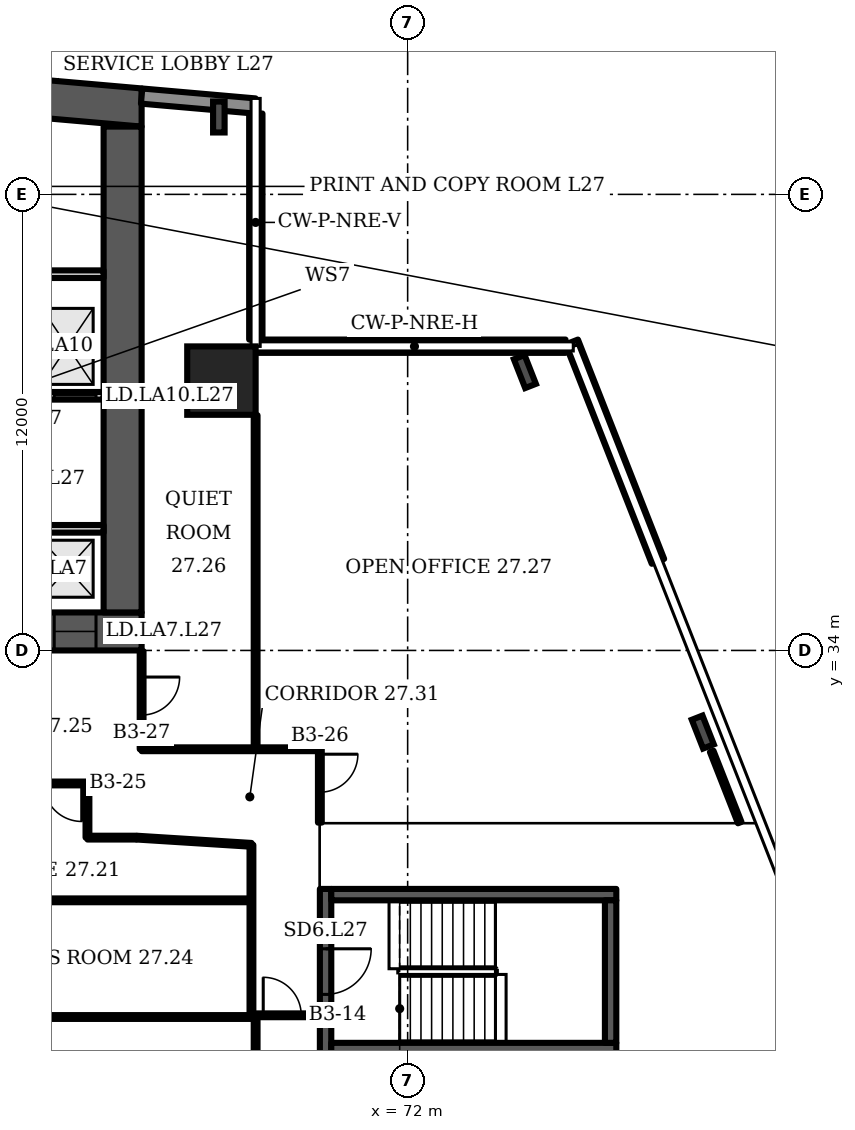
"""IFC4 building model, lengths in metres.
Left out: names, types, materials, properties, quantities, classifications, styles, units other than length and angle.
Written with IfcOpenShell. Run it as: python <this file> out.ifc"""

import sys

from ifc_helpers import new_model, si_unit, direction, frame, frame_2d, origin, origin_2d, place, context, subcontext, project, spatial, polyline, rectangle, i_section, outline, extrude, element, fill, save


model = new_model("IFC4")
c1 = context("Model", 3, precision=1e-05, world=origin(), true_north=direction((0.0, 1.0)))
c2 = subcontext(c1, "Body", "Model", "MODEL_VIEW")
j1 = project(units=[si_unit("LENGTHUNIT", "METRE"), si_unit("PLANEANGLEUNIT", "RADIAN")], contexts=[c1])
p1 = place(None, origin())
s1 = spatial("IfcSite", under=j1, at=p1, CompositionType="ELEMENT")
p2 = place(p1, origin())
s2 = spatial("IfcBuilding", under=s1, at=p2, CompositionType="ELEMENT")
p3 = place(p2, frame((0.0, 0.0, 118.3)))
s3 = spatial("IfcBuildingStorey", under=s2, at=p3, CompositionType="ELEMENT", Elevation=118.3)
p4 = place(p3, frame((0.0, 0.0, -0.0)))
e1 = element("IfcWall", 1, at=p4, inside=s3, PredefinedType="SHEAR", context=c2, shape_type="SweptSolid", body=[
    extrude(outline(polyline([(16.0, 47.784), (40.5, 49.927), (65.0, 47.784), (65.0, 48.787), (40.5, 50.931), (16.0, 48.787), (16.0, 47.784)])), origin(), (0.0, 0.0, 1.0), 3.6),
])
p5 = place(p3, frame((16.0, 34.5, 0.0), z_axis=(0.0, 0.0, 1.0), x_axis=(1.0, 0.0, 0.0)))
e2 = element("IfcWall", 2, at=p5, inside=s3, PredefinedType="SHEAR", context=c2, shape_type="SweptSolid", body=[
    extrude(rectangle(XDim=49.0, YDim=1.0, at=frame_2d((24.5, 0.0))), origin(), (0.0, 0.0, 1.0), 3.6),
])
p6 = place(p5, frame((1.2, 0.0, 0.0)))
e3 = element("IfcOpeningElement", 3, at=p6, cuts=e2, PredefinedType="OPENING", context=c2, shape_type="SweptSolid", body=[
    extrude(rectangle(XDim=1.1, YDim=2.1, at=frame_2d((0.55, 1.05))), frame((0.0, 0.51, 0.0), z_axis=(0.0, -1.0, 0.0), x_axis=(1.0, 0.0, 0.0)), (0.0, 0.0, 1.0), 1.02),
])
p7 = place(p5, frame((5.083, 0.0, 0.0)))
e4 = element("IfcOpeningElement", 4, at=p7, cuts=e2, PredefinedType="OPENING", context=c2, shape_type="SweptSolid", body=[
    extrude(rectangle(XDim=1.1, YDim=2.1, at=frame_2d((0.55, 1.05))), frame((0.0, 0.51, 0.0), z_axis=(0.0, -1.0, 0.0), x_axis=(1.0, 0.0, 0.0)), (0.0, 0.0, 1.0), 1.02),
])
p8 = place(p5, frame((2.933, 0.0, 0.0)))
e5 = element("IfcOpeningElement", 5, at=p8, cuts=e2, PredefinedType="OPENING", context=c2, shape_type="SweptSolid", body=[
    extrude(rectangle(XDim=1.4, YDim=2.1, at=frame_2d((0.7, 1.05))), frame((0.0, 0.51, 0.0), z_axis=(0.0, -1.0, 0.0), x_axis=(1.0, 0.0, 0.0)), (0.0, 0.0, 1.0), 1.02),
])
p9 = place(p5, frame((7.65, 0.0, 0.0)))
e6 = element("IfcOpeningElement", 6, at=p9, cuts=e2, PredefinedType="OPENING", context=c2, shape_type="SweptSolid", body=[
    extrude(rectangle(XDim=1.2, YDim=2.1, at=frame_2d((0.6, 1.05))), frame((0.0, 0.51, 0.0), z_axis=(0.0, -1.0, 0.0), x_axis=(1.0, 0.0, 0.0)), (0.0, 0.0, 1.0), 1.02),
])
p10 = place(p5, frame((14.817, 0.0, 0.0)))
e7 = element("IfcOpeningElement", 7, at=p10, cuts=e2, PredefinedType="OPENING", context=c2, shape_type="SweptSolid", body=[
    extrude(rectangle(XDim=1.1, YDim=2.1, at=frame_2d((0.55, 1.05))), frame((0.0, 0.51, 0.0), z_axis=(0.0, -1.0, 0.0), x_axis=(1.0, 0.0, 0.0)), (0.0, 0.0, 1.0), 1.02),
])
p11 = place(p5, frame((19.083, 0.0, 0.0)))
e8 = element("IfcOpeningElement", 8, at=p11, cuts=e2, PredefinedType="OPENING", context=c2, shape_type="SweptSolid", body=[
    extrude(rectangle(XDim=1.1, YDim=2.1, at=frame_2d((0.55, 1.05))), frame((0.0, 0.51, 0.0), z_axis=(0.0, -1.0, 0.0), x_axis=(1.0, 0.0, 0.0)), (0.0, 0.0, 1.0), 1.02),
])
p12 = place(p5, frame((16.8, 0.0, 0.0)))
e9 = element("IfcOpeningElement", 9, at=p12, cuts=e2, PredefinedType="OPENING", context=c2, shape_type="SweptSolid", body=[
    extrude(rectangle(XDim=1.4, YDim=2.1, at=frame_2d((0.7, 1.05))), frame((0.0, 0.51, 0.0), z_axis=(0.0, -1.0, 0.0), x_axis=(1.0, 0.0, 0.0)), (0.0, 0.0, 1.0), 1.02),
])
p13 = place(p5, frame((21.817, 0.0, 0.0)))
e10 = element("IfcOpeningElement", 10, at=p13, cuts=e2, PredefinedType="OPENING", context=c2, shape_type="SweptSolid", body=[
    extrude(rectangle(XDim=1.1, YDim=2.1, at=frame_2d((0.55, 1.05))), frame((0.0, 0.51, 0.0), z_axis=(0.0, -1.0, 0.0), x_axis=(1.0, 0.0, 0.0)), (0.0, 0.0, 1.0), 1.02),
])
p14 = place(p5, frame((26.083, 0.0, 0.0)))
e11 = element("IfcOpeningElement", 11, at=p14, cuts=e2, PredefinedType="OPENING", context=c2, shape_type="SweptSolid", body=[
    extrude(rectangle(XDim=1.1, YDim=2.1, at=frame_2d((0.55, 1.05))), frame((0.0, 0.51, 0.0), z_axis=(0.0, -1.0, 0.0), x_axis=(1.0, 0.0, 0.0)), (0.0, 0.0, 1.0), 1.02),
])
p15 = place(p5, frame((33.15, 0.0, 0.0)))
e12 = element("IfcOpeningElement", 12, at=p15, cuts=e2, PredefinedType="OPENING", context=c2, shape_type="SweptSolid", body=[
    extrude(rectangle(XDim=1.2, YDim=2.1, at=frame_2d((0.6, 1.05))), frame((0.0, 0.51, 0.0), z_axis=(0.0, -1.0, 0.0), x_axis=(1.0, 0.0, 0.0)), (0.0, 0.0, 1.0), 1.02),
])
p16 = place(p5, frame((37.8, 0.0, 0.0)))
e13 = element("IfcOpeningElement", 13, at=p16, cuts=e2, PredefinedType="OPENING", context=c2, shape_type="SweptSolid", body=[
    extrude(rectangle(XDim=1.4, YDim=2.1, at=frame_2d((0.7, 1.05))), frame((0.0, 0.51, 0.0), z_axis=(0.0, -1.0, 0.0), x_axis=(1.0, 0.0, 0.0)), (0.0, 0.0, 1.0), 1.02),
])
p17 = place(p5, frame((42.817, 0.0, 0.0)))
e14 = element("IfcOpeningElement", 14, at=p17, cuts=e2, PredefinedType="OPENING", context=c2, shape_type="SweptSolid", body=[
    extrude(rectangle(XDim=1.1, YDim=2.1, at=frame_2d((0.55, 1.05))), frame((0.0, 0.51, 0.0), z_axis=(0.0, -1.0, 0.0), x_axis=(1.0, 0.0, 0.0)), (0.0, 0.0, 1.0), 1.02),
])
p18 = place(p5, frame((46.7, 0.0, 0.0)))
e15 = element("IfcOpeningElement", 15, at=p18, cuts=e2, PredefinedType="OPENING", context=c2, shape_type="SweptSolid", body=[
    extrude(rectangle(XDim=1.1, YDim=2.1, at=frame_2d((0.55, 1.05))), frame((0.0, 0.51, 0.0), z_axis=(0.0, -1.0, 0.0), x_axis=(1.0, 0.0, 0.0)), (0.0, 0.0, 1.0), 1.02),
])
p19 = place(p5, frame((44.667, 0.0, 0.0)))
e16 = element("IfcOpeningElement", 16, at=p19, cuts=e2, PredefinedType="OPENING", context=c2, shape_type="SweptSolid", body=[
    extrude(rectangle(XDim=1.4, YDim=2.1, at=frame_2d((0.7, 1.05))), frame((0.0, 0.51, 0.0), z_axis=(0.0, -1.0, 0.0), x_axis=(1.0, 0.0, 0.0)), (0.0, 0.0, 1.0), 1.02),
])
p20 = place(p3, frame((64.5, 35.0, 0.0), z_axis=(0.0, 0.0, 1.0), x_axis=(0.0, 1.0, 0.0)))
e17 = element("IfcWall", 17, at=p20, inside=s3, PredefinedType="SHEAR", context=c2, shape_type="SweptSolid", body=[
    extrude(rectangle(XDim=12.784, YDim=1.0, at=frame_2d((6.392, 0.0))), origin(), (0.0, 0.0, 1.0), 3.6),
])
p21 = place(p3, frame((67.1, 41.1, 0.0), z_axis=(0.0, 0.0, 1.0), x_axis=(1.0, 0.0, 0.0)))
e18 = element("IfcColumn", 18, at=p21, inside=s3, PredefinedType="COLUMN", context=c2, shape_type="SweptSolid", body=[
    extrude(rectangle(XDim=1.8, YDim=1.8, at=origin_2d()), origin(), (0.0, 0.0, 1.0), 3.6),
])
for number, where, z_axis, x_axis in (
    (19, (79.766, 31.853, 0.0), (0.0, 0.0, 1.0), (0.931, 0.366, 0.0)),
    (20, (75.085, 41.338, 0.0), (0.0, 0.0, 1.0), (0.931, 0.366, 0.0)),
    (21, (67.032, 48.036, 0.0), (0.0, 0.0, 1.0), (1.0, 0.0, 0.0)),
):
    element("IfcColumn", number, at=place(p3, frame(where, z_axis=z_axis, x_axis=x_axis)), inside=s3, PredefinedType="COLUMN", context=c2, shape_type="SweptSolid", body=[
        extrude(i_section(OverallWidth=0.303, OverallDepth=0.814, WebThickness=0.021, FlangeThickness=0.04, FilletRadius=0.03, at=origin_2d()), origin(), (0.0, 0.0, 1.0), 3.6),
    ])
p22 = place(p3, frame((67.983, 48.326, 0.0), z_axis=(0.0, 0.0, 1.0), x_axis=(-0.996194, 0.087168, 0.0)))
e22 = element("IfcWall", 22, at=p22, inside=s3, PredefinedType="SOLIDWALL", context=c2, shape_type="SweptSolid", body=[
    extrude(rectangle(XDim=2.994, YDim=0.4, at=frame_2d((1.497, 0.0))), origin(), (0.0, 0.0, 1.0), 3.2),
])
p23 = place(p3, frame((78.586, 36.344, 0.0), z_axis=(0.0, 0.0, 1.0), x_axis=(-0.365792, 0.930699, 0.0)))
e23 = element("IfcWall", 23, at=p23, inside=s3, PredefinedType="SOLIDWALL", context=c2, shape_type="SweptSolid", body=[
    extrude(rectangle(XDim=6.202, YDim=0.35, at=frame_2d((3.101, 0.0))), origin(), (0.0, 0.0, 1.0), 1.0),
])
p24 = place(p3, frame((76.155, 42.005, 0.0), z_axis=(0.0, 0.0, 1.0), x_axis=(-1.0, 0.0, 0.0)))
e24 = element("IfcWall", 24, at=p24, inside=s3, PredefinedType="SOLIDWALL", context=c2, shape_type="SweptSolid", body=[
    extrude(rectangle(XDim=8.155, YDim=0.35, at=frame_2d((4.078, 0.0))), origin(), (0.0, 0.0, 1.0), 1.0),
])
p25 = place(p3, frame((68.005, 42.18, 0.0), z_axis=(0.0, 0.0, 1.0), x_axis=(0.0, 1.0, 0.0)))
e25 = element("IfcWall", 25, at=p25, inside=s3, PredefinedType="SOLIDWALL", context=c2, shape_type="SweptSolid", body=[
    extrude(rectangle(XDim=5.947, YDim=0.35, at=frame_2d((2.973, 0.0))), origin(), (0.0, 0.0, 1.0), 1.0),
])
p26 = place(p3, frame((58.5, 40.7, 0.0), z_axis=(0.0, 0.0, 1.0), x_axis=(1.0, 0.0, 0.0)))
e26 = element("IfcWall", 26, at=p26, inside=s3, PredefinedType="PARTITIONING", context=c2, shape_type="SweptSolid", body=[
    extrude(rectangle(XDim=5.5, YDim=0.2, at=frame_2d((2.75, 0.0))), origin(), (0.0, 0.0, 1.0), 3.2),
])
p27 = place(p26, frame((0.317, 0.0, 0.0)))
e27 = element("IfcOpeningElement", 27, at=p27, cuts=e26, PredefinedType="OPENING", context=c2, shape_type="SweptSolid", body=[
    extrude(rectangle(XDim=1.1, YDim=2.1, at=frame_2d((0.55, 1.05))), frame((0.0, 0.11, 0.0), z_axis=(0.0, -1.0, 0.0), x_axis=(1.0, 0.0, 0.0)), (0.0, 0.0, 1.0), 0.22),
])
p28 = place(p26, frame((2.317, 0.0, 0.0)))
e28 = element("IfcOpeningElement", 28, at=p28, cuts=e26, PredefinedType="OPENING", context=c2, shape_type="SweptSolid", body=[
    extrude(rectangle(XDim=1.1, YDim=2.1, at=frame_2d((0.55, 1.05))), frame((0.0, 0.11, 0.0), z_axis=(0.0, -1.0, 0.0), x_axis=(1.0, 0.0, 0.0)), (0.0, 0.0, 1.0), 0.22),
])
p29 = place(p26, frame((4.2, 0.0, 0.0)))
e29 = element("IfcOpeningElement", 29, at=p29, cuts=e26, PredefinedType="OPENING", context=c2, shape_type="SweptSolid", body=[
    extrude(rectangle(XDim=1.1, YDim=2.1, at=frame_2d((0.55, 1.05))), frame((0.0, 0.11, 0.0), z_axis=(0.0, -1.0, 0.0), x_axis=(1.0, 0.0, 0.0)), (0.0, 0.0, 1.0), 0.22),
])
p30 = place(p3, frame((0.0, 0.0, -0.0)))
e30 = element("IfcWall", 30, at=p30, inside=s3, PredefinedType="PARTITIONING", context=c2, shape_type="SweptSolid", body=[
    extrude(outline(polyline([(62.3, 37.3), (62.5, 37.3), (64.0, 37.3), (64.0, 37.1), (62.5, 37.1), (62.5, 35.0), (62.3, 35.0), (62.3, 37.3)])), origin(), (0.0, 0.0, 1.0), 3.2),
])
p31 = place(p3, frame((0.0, 0.0, -0.0)))
e31 = element("IfcWall", 31, at=p31, inside=s3, PredefinedType="PARTITIONING", context=c2, shape_type="SweptSolid", body=[
    extrude(outline(polyline([(60.433, 40.8), (60.233, 40.8), (60.233, 43.8), (58.5, 43.8), (58.5, 44.0), (64.0, 44.0), (64.0, 43.8), (62.5, 43.8), (62.5, 40.8), (62.3, 40.8), (62.3, 43.8), (60.433, 43.8), (60.433, 40.8)])), origin(), (0.0, 0.0, 1.0), 3.2),
])
p32 = place(p3, frame((69.84, 23.375, 0.0), z_axis=(0.0, 0.0, 1.0), x_axis=(0.0, 1.0, 0.0)))
e32 = element("IfcWall", 32, at=p32, inside=s3, PredefinedType="SHEAR", context=c2, shape_type="SweptSolid", body=[
    extrude(rectangle(XDim=4.35, YDim=0.3, at=frame_2d((2.175, 0.0))), origin(), (0.0, 0.0, 1.0), 3.2),
])
p33 = place(p32, frame((1.575, 0.0, 0.0)))
e33 = element("IfcOpeningElement", 33, at=p33, cuts=e32, PredefinedType="OPENING", context=c2, shape_type="SweptSolid", body=[
    extrude(rectangle(XDim=1.2, YDim=2.1, at=frame_2d((0.6, 1.05))), frame((0.0, 0.16, 0.0), z_axis=(0.0, -1.0, 0.0), x_axis=(1.0, 0.0, 0.0)), (0.0, 0.0, 1.0), 0.32),
])
p34 = place(p3, frame((59.4, 24.355, 0.0), z_axis=(0.0, 0.0, 1.0), x_axis=(1.0, 0.0, 0.0)))
e34 = element("IfcWall", 34, at=p34, inside=s3, PredefinedType="PARTITIONING", context=c2, shape_type="SweptSolid", body=[
    extrude(rectangle(XDim=8.6, YDim=0.1, at=frame_2d((4.3, 0.0))), origin(), (0.0, 0.0, 1.0), 3.2),
])
p35 = place(p3, frame((59.4, 27.425, 0.0), z_axis=(0.0, 0.0, 1.0), x_axis=(1.0, 0.0, 0.0)))
e35 = element("IfcWall", 35, at=p35, inside=s3, PredefinedType="PARTITIONING", context=c2, shape_type="SweptSolid", body=[
    extrude(rectangle(XDim=8.49, YDim=0.1, at=frame_2d((4.245, 0.0))), origin(), (0.0, 0.0, 1.0), 3.2),
])
p36 = place(p3, frame((59.4, 30.5, 0.0), z_axis=(0.0, 0.0, 1.0), x_axis=(1.0, 0.0, 0.0)))
e36 = element("IfcWall", 36, at=p36, inside=s3, PredefinedType="PARTITIONING", context=c2, shape_type="SweptSolid", body=[
    extrude(rectangle(XDim=4.175, YDim=0.1, at=frame_2d((2.087, 0.0))), origin(), (0.0, 0.0, 1.0), 3.2),
])
p37 = place(p36, frame((3.025, 0.0, 0.0)))
e37 = element("IfcOpeningElement", 37, at=p37, cuts=e36, PredefinedType="OPENING", context=c2, shape_type="SweptSolid", body=[
    extrude(rectangle(XDim=1.0, YDim=2.1, at=frame_2d((0.5, 1.05))), frame((0.0, 0.06, 0.0), z_axis=(0.0, -1.0, 0.0), x_axis=(1.0, 0.0, 0.0)), (0.0, 0.0, 1.0), 0.12),
])
p38 = place(p3, frame((63.575, 29.075, 0.0), z_axis=(0.0, 0.0, 1.0), x_axis=(0.0, 1.0, 0.0)))
e38 = element("IfcWall", 38, at=p38, inside=s3, PredefinedType="PARTITIONING", context=c2, shape_type="SweptSolid", body=[
    extrude(rectangle(XDim=1.425, YDim=0.1, at=frame_2d((0.712, 0.0))), origin(), (0.0, 0.0, 1.0), 3.2),
])
p39 = place(p3, frame((63.575, 29.075, 0.0), z_axis=(0.0, 0.0, 1.0), x_axis=(1.0, 0.0, 0.0)))
e39 = element("IfcWall", 39, at=p39, inside=s3, PredefinedType="PARTITIONING", context=c2, shape_type="SweptSolid", body=[
    extrude(rectangle(XDim=1.285, YDim=0.1, at=frame_2d((0.643, 0.0))), origin(), (0.0, 0.0, 1.0), 3.2),
])
p40 = place(p3, frame((65.0, 31.4, 0.0), z_axis=(0.0, 0.0, 1.0), x_axis=(0.0, 1.0, 0.0)))
e40 = element("IfcWall", 40, at=p40, inside=s3, PredefinedType="PARTITIONING", context=c2, shape_type="SweptSolid", body=[
    extrude(rectangle(XDim=2.58, YDim=0.1, at=frame_2d((1.29, 0.0))), origin(), (0.0, 0.0, 1.0), 3.2),
])
p41 = place(p40, frame((0.9, 0.0, 0.0)))
e41 = element("IfcOpeningElement", 41, at=p41, cuts=e40, PredefinedType="OPENING", context=c2, shape_type="SweptSolid", body=[
    extrude(rectangle(XDim=1.0, YDim=2.1, at=frame_2d((0.5, 1.05))), frame((0.0, 0.06, 0.0), z_axis=(0.0, -1.0, 0.0), x_axis=(1.0, 0.0, 0.0)), (0.0, 0.0, 1.0), 0.12),
])
p42 = place(p3, frame((65.0, 31.4, 0.0), z_axis=(0.0, 0.0, 1.0), x_axis=(1.0, 0.0, 0.0)))
e42 = element("IfcWall", 42, at=p42, inside=s3, PredefinedType="PARTITIONING", context=c2, shape_type="SweptSolid", body=[
    extrude(rectangle(XDim=4.69, YDim=0.1, at=frame_2d((2.345, 0.0))), origin(), (0.0, 0.0, 1.0), 3.2),
])
p43 = place(p3, frame((67.89, 24.4, 0.0), z_axis=(0.0, 0.0, 1.0), x_axis=(0.0, 1.0, 0.0)))
e43 = element("IfcWall", 43, at=p43, inside=s3, PredefinedType="PARTITIONING", context=c2, shape_type="SweptSolid", body=[
    extrude(rectangle(XDim=4.485, YDim=0.1, at=frame_2d((2.243, 0.0))), origin(), (0.0, 0.0, 1.0), 3.2),
])
p44 = place(p3, frame((68.0, 24.4, 0.0), z_axis=(0.0, 0.0, 1.0), x_axis=(1.0, 0.0, 0.0)))
e44 = element("IfcWall", 44, at=p44, inside=s3, PredefinedType="PARTITIONING", context=c2, shape_type="SweptSolid", body=[
    extrude(rectangle(XDim=1.67, YDim=0.1, at=frame_2d((0.835, 0.0))), origin(), (0.0, 0.0, 1.0), 3.2),
])
p45 = place(p44, frame((0.2, 0.0, 0.0)))
e45 = element("IfcOpeningElement", 45, at=p45, cuts=e44, PredefinedType="OPENING", context=c2, shape_type="SweptSolid", body=[
    extrude(rectangle(XDim=1.0, YDim=2.1, at=frame_2d((0.5, 1.05))), frame((0.0, 0.06, 0.0), z_axis=(0.0, -1.0, 0.0), x_axis=(1.0, 0.0, 0.0)), (0.0, 0.0, 1.0), 0.12),
])
p46 = place(p3, frame((67.89, 28.885, 0.0), z_axis=(0.0, 0.0, 1.0), x_axis=(-0.998031, 0.062786, 0.0)))
e46 = element("IfcWall", 46, at=p46, inside=s3, PredefinedType="PARTITIONING", context=c2, shape_type="SweptSolid", body=[
    extrude(rectangle(XDim=3.021, YDim=0.1, at=frame_2d((1.511, 0.0))), origin(), (0.0, 0.0, 1.0), 3.2),
])
p47 = place(p3, frame((68.0, 15.13, 0.0), z_axis=(0.0, 0.0, 1.0), x_axis=(0.0, 1.0, 0.0)))
e47 = element("IfcWall", 47, at=p47, inside=s3, PredefinedType="PARTITIONING", context=c2, shape_type="SweptSolid", body=[
    extrude(rectangle(XDim=9.22, YDim=0.1, at=frame_2d((4.61, 0.0))), origin(), (0.0, 0.0, 1.0), 3.2),
])
p48 = place(p3, frame((68.0, 31.4, 0.0), z_axis=(0.0, 0.0, 1.0), x_axis=(0.0, 1.0, 0.0)))
e48 = element("IfcWall", 48, at=p48, inside=s3, PredefinedType="PARTITIONING", context=c2, shape_type="SweptSolid", body=[
    extrude(rectangle(XDim=8.79, YDim=0.1, at=frame_2d((4.395, 0.0))), origin(), (0.0, 0.0, 1.0), 3.2),
])
p49 = place(p3, frame((69.69, 29.47, 0.0), z_axis=(0.0, 0.0, 1.0), x_axis=(0.0, 1.0, 0.0)))
e49 = element("IfcWall", 49, at=p49, inside=s3, PredefinedType="PARTITIONING", context=c2, shape_type="SweptSolid", body=[
    extrude(rectangle(XDim=1.93, YDim=0.1, at=frame_2d((0.965, 0.0))), origin(), (0.0, 0.0, 1.0), 3.2),
])
p50 = place(p49, frame((0.8, 0.0, 0.0)))
e50 = element("IfcOpeningElement", 50, at=p50, cuts=e49, PredefinedType="OPENING", context=c2, shape_type="SweptSolid", body=[
    extrude(rectangle(XDim=1.0, YDim=2.1, at=frame_2d((0.5, 1.05))), frame((0.0, 0.06, 0.0), z_axis=(0.0, -1.0, 0.0), x_axis=(1.0, 0.0, 0.0)), (0.0, 0.0, 1.0), 0.12),
])
p51 = place(p3, frame((80.737, 29.47, 0.0), z_axis=(0.0, 0.0, 1.0), x_axis=(-0.365847, 0.930674, 0.0)))
e51 = element("IfcWall", 51, at=p51, inside=s3, PredefinedType="PARTITIONING", context=c2, shape_type="SweptSolid", body=[
    extrude(rectangle(XDim=2.015, YDim=0.1, at=frame_2d((1.007, 0.0))), origin(), (0.0, 0.0, 1.0), 2.58),
])
for number, where, z_axis, x_axis in (
    (52, (69.99, 23.525, 0.0), (0.0, 0.0, 1.0), (1.0, 0.0, 0.0)),
    (53, (69.99, 27.575, 0.0), (0.0, 0.0, 1.0), (1.0, 0.0, 0.0)),
):
    element("IfcWall", number, at=place(p3, frame(where, z_axis=z_axis, x_axis=x_axis)), inside=s3, PredefinedType="SHEAR", context=c2, shape_type="SweptSolid", body=[
        extrude(rectangle(XDim=7.5, YDim=0.3, at=frame_2d((3.75, 0.0))), origin(), (0.0, 0.0, 1.0), 3.2),
    ])
p52 = place(p3, frame((77.34, 23.675, 0.0), z_axis=(0.0, 0.0, 1.0), x_axis=(0.0, 1.0, 0.0)))
e54 = element("IfcWall", 54, at=p52, inside=s3, PredefinedType="SHEAR", context=c2, shape_type="SweptSolid", body=[
    extrude(rectangle(XDim=3.75, YDim=0.3, at=frame_2d((1.875, 0.0))), origin(), (0.0, 0.0, 1.0), 3.2),
])
p53 = place(p18, origin())
e55 = element("IfcDoor", 55, at=p53, inside=s3, OperationType="DOUBLE_DOOR_SLIDING", PredefinedType="DOOR", context=c2, shape_type="SweptSolid", body=[
    extrude(rectangle(XDim=1.1, YDim=2.1, at=frame_2d((0.55, 1.05))), frame((0.0, 0.025, 0.0), z_axis=(0.0, -1.0, 0.0), x_axis=(1.0, 0.0, 0.0)), (0.0, 0.0, 1.0), 0.05),
])
fill(e15, e55)
p54 = place(p29, origin())
e56 = element("IfcDoor", 56, at=p54, inside=s3, OperationType="DOUBLE_DOOR_SLIDING", PredefinedType="DOOR", context=c2, shape_type="SweptSolid", body=[
    extrude(rectangle(XDim=1.1, YDim=2.1, at=frame_2d((0.55, 1.05))), frame((0.0, 0.025, 0.0), z_axis=(0.0, -1.0, 0.0), x_axis=(1.0, 0.0, 0.0)), (0.0, 0.0, 1.0), 0.05),
])
fill(e29, e56)
p55 = place(p33, origin())
e57 = element("IfcDoor", 57, at=p55, inside=s3, OperationType="SINGLE_SWING_RIGHT", PredefinedType="DOOR", context=c2, shape_type="SweptSolid", body=[
    extrude(rectangle(XDim=1.2, YDim=2.1, at=frame_2d((0.6, 1.05))), frame((0.0, 0.025, 0.0), z_axis=(0.0, -1.0, 0.0), x_axis=(1.0, 0.0, 0.0)), (0.0, 0.0, 1.0), 0.05),
])
fill(e33, e57)
p56 = place(p45, origin())
e58 = element("IfcDoor", 58, at=p56, inside=s3, OperationType="SINGLE_SWING_LEFT", PredefinedType="DOOR", context=c2, shape_type="SweptSolid", body=[
    extrude(rectangle(XDim=1.0, YDim=2.1, at=frame_2d((0.5, 1.05))), frame((0.0, 0.025, 0.0), z_axis=(0.0, -1.0, 0.0), x_axis=(1.0, 0.0, 0.0)), (0.0, 0.0, 1.0), 0.05),
])
fill(e45, e58)
p57 = place(p37, origin())
e59 = element("IfcDoor", 59, at=p57, inside=s3, OperationType="SINGLE_SWING_RIGHT", PredefinedType="DOOR", context=c2, shape_type="SweptSolid", body=[
    extrude(rectangle(XDim=1.0, YDim=2.1, at=frame_2d((0.5, 1.05))), frame((0.0, 0.025, 0.0), z_axis=(0.0, -1.0, 0.0), x_axis=(1.0, 0.0, 0.0)), (0.0, 0.0, 1.0), 0.05),
])
fill(e37, e59)
p58 = place(p50, origin())
e60 = element("IfcDoor", 60, at=p58, inside=s3, OperationType="SINGLE_SWING_RIGHT", PredefinedType="DOOR", context=c2, shape_type="SweptSolid", body=[
    extrude(rectangle(XDim=1.0, YDim=2.1, at=frame_2d((0.5, 1.05))), frame((0.0, 0.025, 0.0), z_axis=(0.0, -1.0, 0.0), x_axis=(1.0, 0.0, 0.0)), (0.0, 0.0, 1.0), 0.05),
])
fill(e50, e60)
p59 = place(p41, origin())
e61 = element("IfcDoor", 61, at=p59, inside=s3, OperationType="SINGLE_SWING_RIGHT", PredefinedType="DOOR", context=c2, shape_type="SweptSolid", body=[
    extrude(rectangle(XDim=1.0, YDim=2.1, at=frame_2d((0.5, 1.05))), frame((0.0, 0.025, 0.0), z_axis=(0.0, -1.0, 0.0), x_axis=(1.0, 0.0, 0.0)), (0.0, 0.0, 1.0), 0.05),
])
fill(e41, e61)
save(model, sys.argv[1])
